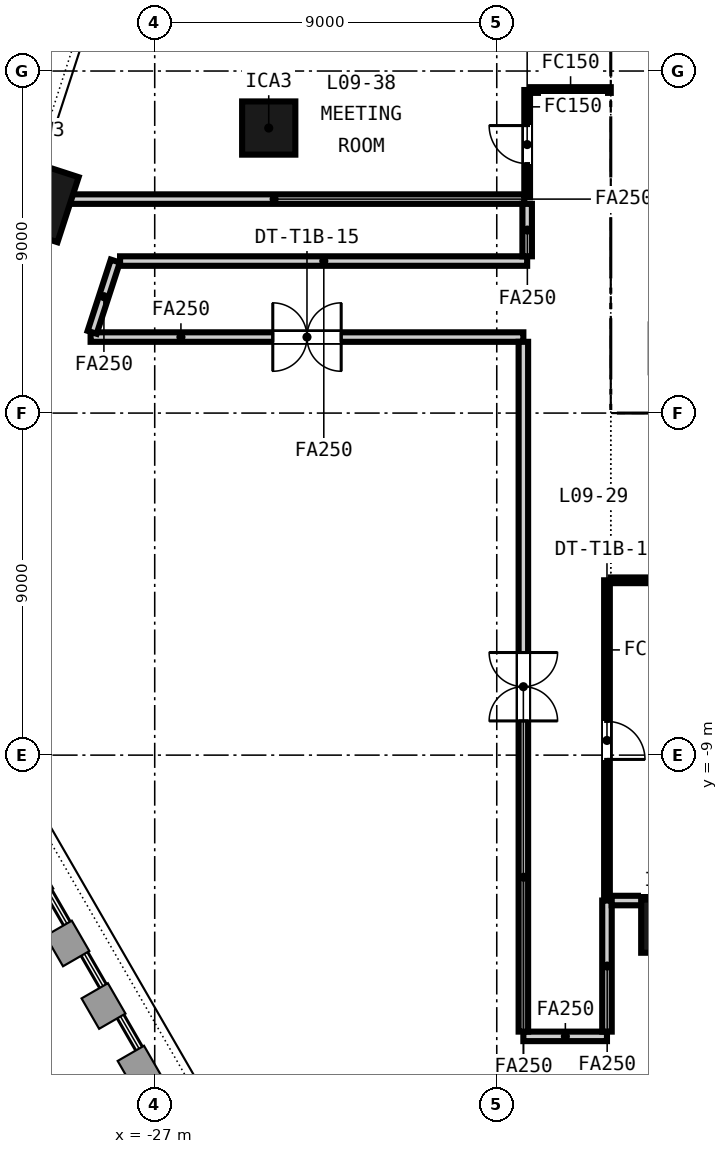
"""IFC4 building model, lengths in metres.
Left out: names, types, materials, properties, quantities, classifications, styles, units other than length and angle.
Written with IfcOpenShell. Run it as: python <this file> out.ifc"""

import sys

from ifc_helpers import new_model, si_unit, direction, frame, frame_2d, origin, origin_2d, place, context, subcontext, project, spatial, rectangle, extrude, element, fill, save


model = new_model("IFC4")
c1 = context("Model", 3, precision=1e-05, world=origin(), true_north=direction((0.0, 1.0)))
c2 = subcontext(c1, "Body", "Model", "MODEL_VIEW")
j1 = project(units=[si_unit("LENGTHUNIT", "METRE"), si_unit("PLANEANGLEUNIT", "RADIAN")], contexts=[c1])
p1 = place(None, origin())
s1 = spatial("IfcSite", under=j1, at=p1, CompositionType="ELEMENT")
p2 = place(p1, origin())
s2 = spatial("IfcBuilding", under=s1, at=p2, CompositionType="ELEMENT")
p3 = place(p2, frame((0.0, 0.0, 46.95)))
s3 = spatial("IfcBuildingStorey", under=s2, at=p3, CompositionType="ELEMENT", Elevation=46.95)
p4 = place(p3, frame((-15.0, 0.5, -0.15), z_axis=(0.0, 0.0, 1.0), x_axis=(1.0, 0.0, 0.0)))
e1 = element("IfcWall", 1, at=p4, inside=s3, PredefinedType="SOLIDWALL", context=c2, shape_type="SweptSolid", body=[
    extrude(rectangle(XDim=30.0, YDim=1.0, at=frame_2d((15.0, 0.0))), origin(), (0.0, 0.0, 1.0), 3.65),
])
p5 = place(p4, frame((5.8, 0.0, 0.15)))
e2 = element("IfcOpeningElement", 2, at=p5, cuts=e1, PredefinedType="OPENING", context=c2, shape_type="SweptSolid", body=[
    extrude(rectangle(XDim=2.4, YDim=2.4, at=frame_2d((1.2, 1.2))), frame((0.0, 0.51, 0.0), z_axis=(0.0, -1.0, 0.0), x_axis=(1.0, 0.0, 0.0)), (0.0, 0.0, 1.0), 1.02),
])
p6 = place(p4, frame((13.8, 0.0, 0.15)))
e3 = element("IfcOpeningElement", 3, at=p6, cuts=e1, PredefinedType="OPENING", context=c2, shape_type="SweptSolid", body=[
    extrude(rectangle(XDim=2.4, YDim=2.4, at=frame_2d((1.2, 1.2))), frame((0.0, 0.51, 0.0), z_axis=(0.0, -1.0, 0.0), x_axis=(1.0, 0.0, 0.0)), (0.0, 0.0, 1.0), 1.02),
])
p7 = place(p4, frame((21.8, 0.0, 0.15)))
e4 = element("IfcOpeningElement", 4, at=p7, cuts=e1, PredefinedType="OPENING", context=c2, shape_type="SweptSolid", body=[
    extrude(rectangle(XDim=2.4, YDim=2.4, at=frame_2d((1.2, 1.2))), frame((0.0, 0.51, 0.0), z_axis=(0.0, -1.0, 0.0), x_axis=(1.0, 0.0, 0.0)), (0.0, 0.0, 1.0), 1.02),
])
p8 = place(p4, frame((1.5, 0.0, 0.15)))
e5 = element("IfcOpeningElement", 5, at=p8, cuts=e1, PredefinedType="OPENING", context=c2, shape_type="SweptSolid", body=[
    extrude(rectangle(XDim=1.2, YDim=2.1, at=frame_2d((0.6, 1.05))), frame((0.0, 0.51, 0.0), z_axis=(0.0, -1.0, 0.0), x_axis=(1.0, 0.0, 0.0)), (0.0, 0.0, 1.0), 1.02),
])
p9 = place(p4, frame((27.3, 0.0, 0.15)))
e6 = element("IfcOpeningElement", 6, at=p9, cuts=e1, PredefinedType="OPENING", context=c2, shape_type="SweptSolid", body=[
    extrude(rectangle(XDim=1.2, YDim=2.1, at=frame_2d((0.6, 1.05))), frame((0.0, 0.51, 0.0), z_axis=(0.0, -1.0, 0.0), x_axis=(1.0, 0.0, 0.0)), (0.0, 0.0, 1.0), 1.02),
])
p10 = place(p3, frame((-14.5, 1.0, -0.15), z_axis=(0.0, 0.0, 1.0), x_axis=(0.0, 1.0, 0.0)))
e7 = element("IfcWall", 7, at=p10, inside=s3, PredefinedType="SOLIDWALL", context=c2, shape_type="SweptSolid", body=[
    extrude(rectangle(XDim=13.0, YDim=1.0, at=frame_2d((6.5, 0.0))), origin(), (0.0, 0.0, 1.0), 3.65),
])
p11 = place(p3, frame((-30.136, 5.63, -0.15), z_axis=(0.0, 0.0, 1.0), x_axis=(-0.309016994375, -0.951056516295, 0.0)))
e8 = element("IfcColumn", 8, at=p11, inside=s3, PredefinedType="COLUMN", context=c2, shape_type="SweptSolid", body=[
    extrude(rectangle(XDim=1.8, YDim=1.8, at=origin_2d()), origin(), (0.0, 0.0, 1.0), 3.65),
])
for number, where, z_axis, x_axis in (
    (9, (-24.0, 7.5, -0.15), (0.0, 0.0, 1.0), (1.0, 0.0, 0.0)),
    (10, (-13.5, -13.5, -0.15), (0.0, 0.0, 1.0), (1.0, 0.0, 0.0)),
):
    element("IfcColumn", number, at=place(p3, frame(where, z_axis=z_axis, x_axis=x_axis)), inside=s3, PredefinedType="COLUMN", context=c2, shape_type="SweptSolid", body=[
        extrude(rectangle(XDim=1.4, YDim=1.4, at=origin_2d()), origin(), (0.0, 0.0, 1.0), 3.65),
    ])
p12 = place(p3, frame((-9.152, -4.4, 0.0), z_axis=(0.0, 0.0, 1.0), x_axis=(-1.0, 0.0, 0.0)))
e11 = element("IfcWall", 11, at=p12, inside=s3, PredefinedType="PARTITIONING", context=c2, shape_type="SweptSolid", body=[
    extrude(rectangle(XDim=5.848, YDim=0.15, at=frame_2d((2.924, 0.0))), origin(), (0.0, 0.0, 1.0), 2.741),
])
p13 = place(p3, frame((-15.1, -4.4, 0.0), z_axis=(0.0, 0.0, 1.0), x_axis=(0.0, -1.0, 0.0)))
e12 = element("IfcWall", 12, at=p13, inside=s3, PredefinedType="PARTITIONING", context=c2, shape_type="SweptSolid", body=[
    extrude(rectangle(XDim=8.426, YDim=0.15, at=frame_2d((4.213, 0.0))), origin(), (0.0, 0.0, 1.0), 2.741),
])
p14 = place(p13, frame((3.713, 0.0, 0.0)))
e13 = element("IfcOpeningElement", 13, at=p14, cuts=e12, PredefinedType="OPENING", context=c2, shape_type="SweptSolid", body=[
    extrude(rectangle(XDim=1.0, YDim=2.1, at=frame_2d((0.5, 1.05))), frame((0.0, 0.085, 0.0), z_axis=(0.0, -1.0, 0.0), x_axis=(1.0, 0.0, 0.0)), (0.0, 0.0, 1.0), 0.17),
])
p15 = place(p3, frame((-17.3, 2.0, 0.0), z_axis=(0.0, 0.0, 1.0), x_axis=(-1.0, 0.0, 0.0)))
e14 = element("IfcWall", 14, at=p15, inside=s3, PredefinedType="PARTITIONING", context=c2, shape_type="SweptSolid", body=[
    extrude(rectangle(XDim=11.387, YDim=0.25, at=frame_2d((5.693, 0.0))), origin(), (0.0, 0.0, 1.0), 2.741),
])
p16 = place(p15, frame((4.793, 0.0, 0.0)))
e15 = element("IfcOpeningElement", 15, at=p16, cuts=e14, PredefinedType="OPENING", context=c2, shape_type="SweptSolid", body=[
    extrude(rectangle(XDim=1.8, YDim=2.1, at=frame_2d((0.9, 1.05))), frame((0.0, 0.135, 0.0), z_axis=(0.0, -1.0, 0.0), x_axis=(1.0, 0.0, 0.0)), (0.0, 0.0, 1.0), 0.27),
])
p17 = place(p3, frame((-15.1, -16.4, 0.0), z_axis=(0.0, 0.0, 1.0), x_axis=(-1.0, 0.0, 0.0)))
e16 = element("IfcWall", 16, at=p17, inside=s3, PredefinedType="PARTITIONING", context=c2, shape_type="SweptSolid", body=[
    extrude(rectangle(XDim=2.2, YDim=0.25, at=frame_2d((1.1, 0.0))), origin(), (0.0, 0.0, 1.0), 2.741),
])
p18 = place(p3, frame((-15.1, -12.826, 0.0), z_axis=(0.0, 0.0, 1.0), x_axis=(0.0, -1.0, 0.0)))
e17 = element("IfcWall", 17, at=p18, inside=s3, PredefinedType="PARTITIONING", context=c2, shape_type="SweptSolid", body=[
    extrude(rectangle(XDim=3.449, YDim=0.25, at=frame_2d((1.725, 0.0))), origin(), (0.0, 0.0, 1.0), 2.741),
])
p19 = place(p3, frame((-17.2, 5.68, 0.0), z_axis=(0.0, 0.0, 1.0), x_axis=(0.0, 1.0, 0.0)))
e18 = element("IfcWall", 18, at=p19, inside=s3, PredefinedType="PARTITIONING", context=c2, shape_type="SweptSolid", body=[
    extrude(rectangle(XDim=2.82, YDim=0.15, at=frame_2d((1.41, 0.0))), origin(), (0.0, 0.0, 1.0), 2.741),
])
p20 = place(p19, frame((0.885, 0.0, 0.0)))
e19 = element("IfcOpeningElement", 19, at=p20, cuts=e18, PredefinedType="OPENING", context=c2, shape_type="SweptSolid", body=[
    extrude(rectangle(XDim=1.0, YDim=2.1, at=frame_2d((0.5, 1.05))), frame((0.0, 0.085, 0.0), z_axis=(0.0, -1.0, 0.0), x_axis=(1.0, 0.0, 0.0)), (0.0, 0.0, 1.0), 0.17),
])
p21 = place(p3, frame((-17.125, 8.5, 0.0), z_axis=(0.0, 0.0, 1.0), x_axis=(1.0, 0.0, 0.0)))
e20 = element("IfcWall", 20, at=p21, inside=s3, PredefinedType="PARTITIONING", context=c2, shape_type="SweptSolid", body=[
    extrude(rectangle(XDim=2.125, YDim=0.15, at=frame_2d((1.062, 0.0))), origin(), (0.0, 0.0, 1.0), 2.741),
])
p22 = place(p3, frame((-30.451, 5.63, 0.0), z_axis=(0.0, 0.0, 1.0), x_axis=(1.0, 0.0, 0.0)))
e21 = element("IfcWall", 21, at=p22, inside=s3, PredefinedType="PARTITIONING", context=c2, shape_type="SweptSolid", body=[
    extrude(rectangle(XDim=13.176, YDim=0.25, at=frame_2d((6.588, 0.0))), origin(), (0.0, 0.0, 1.0), 2.741),
])
p23 = place(p3, frame((-14.975, -12.826, 0.0), z_axis=(0.0, 0.0, 1.0), x_axis=(1.0, 0.0, 0.0)))
e22 = element("IfcWall", 22, at=p23, inside=s3, PredefinedType="PARTITIONING", context=c2, shape_type="SweptSolid", body=[
    extrude(rectangle(XDim=5.825, YDim=0.25, at=frame_2d((2.913, 0.0))), origin(), (0.0, 0.0, 1.0), 2.741),
])
p24 = place(p3, frame((-28.646, 2.125, 0.0), z_axis=(0.0, 0.0, 1.0), x_axis=(0.309086072338, 0.951034068731, 0.0)))
e23 = element("IfcWall", 23, at=p24, inside=s3, PredefinedType="PARTITIONING", context=c2, shape_type="SweptSolid", body=[
    extrude(rectangle(XDim=1.971, YDim=0.25, at=frame_2d((0.986, 0.0))), origin(), (0.0, 0.0, 1.0), 2.741),
])
p25 = place(p3, frame((-27.912, 4.0, 0.0), z_axis=(0.0, 0.0, 1.0), x_axis=(1.0, 0.0, 0.0)))
e24 = element("IfcWall", 24, at=p25, inside=s3, PredefinedType="PARTITIONING", context=c2, shape_type="SweptSolid", body=[
    extrude(rectangle(XDim=10.712, YDim=0.25, at=frame_2d((5.356, 0.0))), origin(), (0.0, 0.0, 1.0), 2.741),
])
p26 = place(p3, frame((-17.2, 4.125, 0.0), z_axis=(0.0, 0.0, 1.0), x_axis=(0.0, 1.0, 0.0)))
e25 = element("IfcWall", 25, at=p26, inside=s3, PredefinedType="PARTITIONING", context=c2, shape_type="SweptSolid", body=[
    extrude(rectangle(XDim=1.38, YDim=0.25, at=frame_2d((0.69, 0.0))), origin(), (0.0, 0.0, 1.0), 2.741),
])
p27 = place(p3, frame((-17.3, -16.275, 0.0), z_axis=(0.0, 0.0, 1.0), x_axis=(0.0, 1.0, 0.0)))
e26 = element("IfcWall", 26, at=p27, inside=s3, PredefinedType="PARTITIONING", context=c2, shape_type="SweptSolid", body=[
    extrude(rectangle(XDim=18.15, YDim=0.25, at=frame_2d((9.075, 0.0))), origin(), (0.0, 0.0, 1.0), 2.741),
])
p28 = place(p27, frame((8.175, 0.0, 0.0)))
e27 = element("IfcOpeningElement", 27, at=p28, cuts=e26, PredefinedType="OPENING", context=c2, shape_type="SweptSolid", body=[
    extrude(rectangle(XDim=1.8, YDim=2.1, at=frame_2d((0.9, 1.05))), frame((0.0, 0.135, 0.0), z_axis=(0.0, -1.0, 0.0), x_axis=(1.0, 0.0, 0.0)), (0.0, 0.0, 1.0), 0.27),
])
p29 = place(p20, origin())
e28 = element("IfcDoor", 28, at=p29, inside=s3, OperationType="SINGLE_SWING_RIGHT", PredefinedType="DOOR", context=c2, shape_type="SweptSolid", body=[
    extrude(rectangle(XDim=1.0, YDim=2.1, at=frame_2d((0.5, 1.05))), frame((0.0, 0.025, 0.0), z_axis=(0.0, -1.0, 0.0), x_axis=(1.0, 0.0, 0.0)), (0.0, 0.0, 1.0), 0.05),
])
fill(e19, e28)
p30 = place(p14, origin())
e29 = element("IfcDoor", 29, at=p30, inside=s3, OperationType="SINGLE_SWING_RIGHT", PredefinedType="DOOR", context=c2, shape_type="SweptSolid", body=[
    extrude(rectangle(XDim=1.0, YDim=2.1, at=frame_2d((0.5, 1.05))), frame((0.0, 0.025, 0.0), z_axis=(0.0, -1.0, 0.0), x_axis=(1.0, 0.0, 0.0)), (0.0, 0.0, 1.0), 0.05),
])
fill(e13, e29)
p31 = place(p28, origin())
e30 = element("IfcDoor", 30, at=p31, inside=s3, OperationType="DOUBLE_DOOR_DOUBLE_SWING", PredefinedType="DOOR", context=c2, shape_type="SweptSolid", body=[
    extrude(rectangle(XDim=1.8, YDim=2.1, at=frame_2d((0.9, 1.05))), frame((0.0, 0.025, 0.0), z_axis=(0.0, -1.0, 0.0), x_axis=(1.0, 0.0, 0.0)), (0.0, 0.0, 1.0), 0.05),
])
fill(e27, e30)
p32 = place(p16, origin())
e31 = element("IfcDoor", 31, at=p32, inside=s3, OperationType="DOUBLE_DOOR_DOUBLE_SWING", PredefinedType="DOOR", context=c2, shape_type="SweptSolid", body=[
    extrude(rectangle(XDim=1.8, YDim=2.1, at=frame_2d((0.9, 1.05))), frame((0.0, 0.025, 0.0), z_axis=(0.0, -1.0, 0.0), x_axis=(1.0, 0.0, 0.0)), (0.0, 0.0, 1.0), 0.05),
])
fill(e15, e31)
save(model, sys.argv[1])
